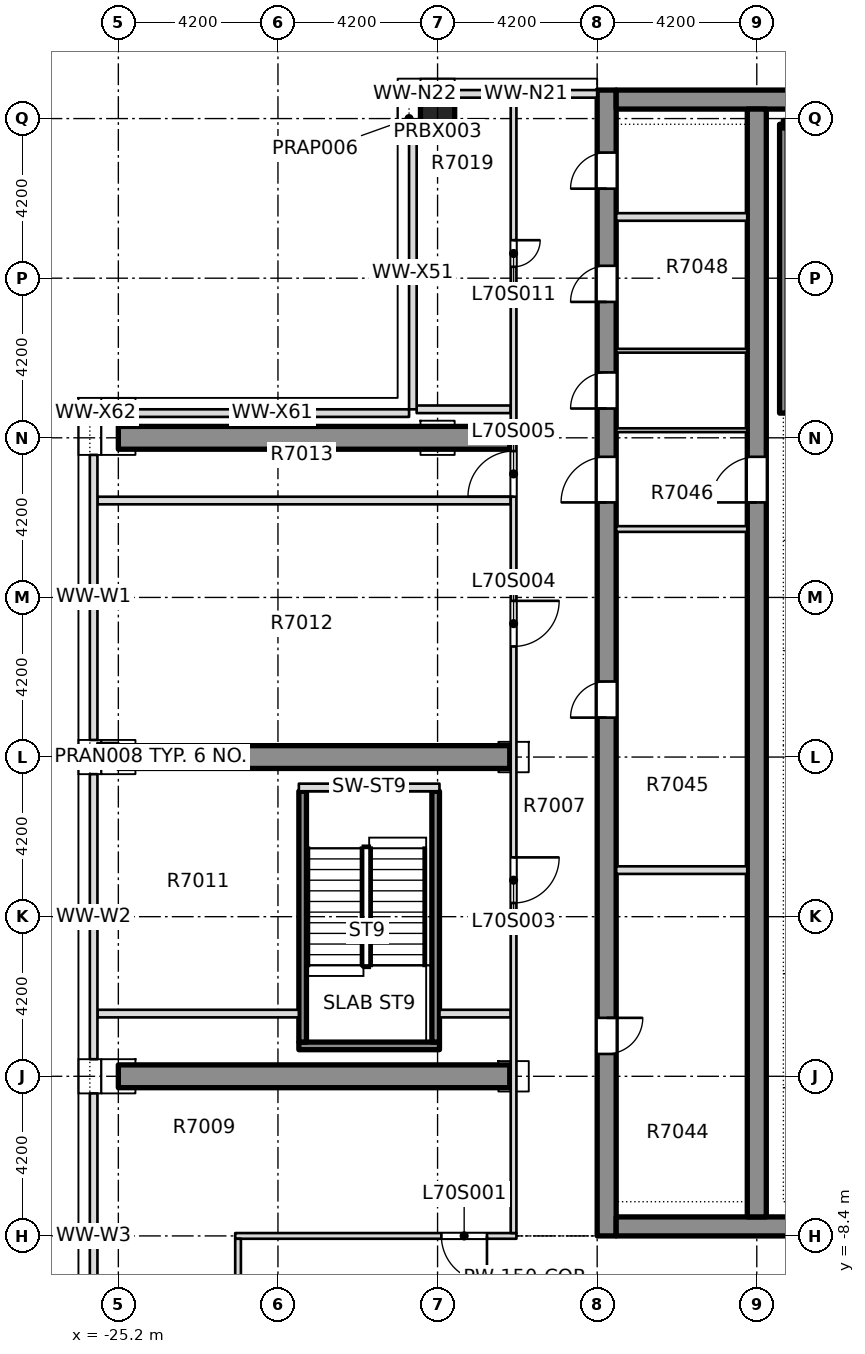
"""IFC4 building model, lengths in metres.
Left out: names, types, materials, properties, quantities, classifications, styles, units other than length and angle.
Written with IfcOpenShell. Run it as: python <this file> out.ifc"""

import sys

from ifc_helpers import new_model, si_unit, direction, frame, frame_2d, origin, origin_2d, place, context, subcontext, project, spatial, rectangle, extrude, element, fill, save


model = new_model("IFC4")
c1 = context("Model", 3, precision=1e-05, world=origin(), true_north=direction((0.0, 1.0)))
c2 = subcontext(c1, "Body", "Model", "MODEL_VIEW")
j1 = project(units=[si_unit("LENGTHUNIT", "METRE"), si_unit("PLANEANGLEUNIT", "RADIAN")], contexts=[c1])
p1 = place(None, origin())
s1 = spatial("IfcSite", under=j1, at=p1, CompositionType="ELEMENT")
p2 = place(p1, origin())
s2 = spatial("IfcBuilding", under=s1, at=p2, CompositionType="ELEMENT")
p3 = place(p2, frame((0.0, 0.0, 264.85)))
s3 = spatial("IfcBuildingStorey", under=s2, at=p3, CompositionType="ELEMENT", Elevation=264.85)
p4 = place(p3, frame((-12.35, -8.4, -0.5), z_axis=(0.0, 0.0, 1.0), x_axis=(0.0, 1.0, 0.0)))
e1 = element("IfcWall", 1, at=p4, inside=s3, PredefinedType="SHEAR", context=c2, shape_type="SweptSolid", body=[
    extrude(rectangle(XDim=30.15, YDim=0.5, at=frame_2d((15.075, 0.0))), origin(), (0.0, 0.0, 1.0), 4.5),
])
p5 = place(p4, frame((4.788, 0.0, 0.5)))
e2 = element("IfcOpeningElement", 2, at=p5, cuts=e1, PredefinedType="OPENING", context=c2, shape_type="SweptSolid", body=[
    extrude(rectangle(XDim=0.95, YDim=2.1, at=frame_2d((0.475, 1.05))), frame((0.0, 0.26, 0.0), z_axis=(0.0, -1.0, 0.0), x_axis=(1.0, 0.0, 0.0)), (0.0, 0.0, 1.0), 0.52),
])
p6 = place(p4, frame((13.638, 0.0, 0.5)))
e3 = element("IfcOpeningElement", 3, at=p6, cuts=e1, PredefinedType="OPENING", context=c2, shape_type="SweptSolid", body=[
    extrude(rectangle(XDim=0.95, YDim=2.1, at=frame_2d((0.475, 1.05))), frame((0.0, 0.26, 0.0), z_axis=(0.0, -1.0, 0.0), x_axis=(1.0, 0.0, 0.0)), (0.0, 0.0, 1.0), 0.52),
])
p7 = place(p4, frame((21.771, 0.0, 0.5)))
e4 = element("IfcOpeningElement", 4, at=p7, cuts=e1, PredefinedType="OPENING", context=c2, shape_type="SweptSolid", body=[
    extrude(rectangle(XDim=0.95, YDim=2.1, at=frame_2d((0.475, 1.05))), frame((0.0, 0.26, 0.0), z_axis=(0.0, -1.0, 0.0), x_axis=(1.0, 0.0, 0.0)), (0.0, 0.0, 1.0), 0.52),
])
p8 = place(p4, frame((24.576, 0.0, 0.5)))
e5 = element("IfcOpeningElement", 5, at=p8, cuts=e1, PredefinedType="OPENING", context=c2, shape_type="SweptSolid", body=[
    extrude(rectangle(XDim=0.95, YDim=2.1, at=frame_2d((0.475, 1.05))), frame((0.0, 0.26, 0.0), z_axis=(0.0, -1.0, 0.0), x_axis=(1.0, 0.0, 0.0)), (0.0, 0.0, 1.0), 0.52),
])
p9 = place(p4, frame((27.555, 0.0, 0.5)))
e6 = element("IfcOpeningElement", 6, at=p9, cuts=e1, PredefinedType="OPENING", context=c2, shape_type="SweptSolid", body=[
    extrude(rectangle(XDim=0.95, YDim=2.1, at=frame_2d((0.475, 1.05))), frame((0.0, 0.26, 0.0), z_axis=(0.0, -1.0, 0.0), x_axis=(1.0, 0.0, 0.0)), (0.0, 0.0, 1.0), 0.52),
])
p10 = place(p4, frame((19.3, 0.0, 0.5)))
e7 = element("IfcOpeningElement", 7, at=p10, cuts=e1, PredefinedType="OPENING", context=c2, shape_type="SweptSolid", body=[
    extrude(rectangle(XDim=1.2, YDim=2.1, at=frame_2d((0.6, 1.05))), frame((0.0, 0.26, 0.0), z_axis=(0.0, -1.0, 0.0), x_axis=(1.0, 0.0, 0.0)), (0.0, 0.0, 1.0), 0.52),
])
p11 = place(p3, frame((-12.1, -8.15, -0.5), z_axis=(0.0, 0.0, 1.0), x_axis=(1.0, 0.0, 0.0)))
e8 = element("IfcWall", 8, at=p11, inside=s3, PredefinedType="SHEAR", context=c2, shape_type="SweptSolid", body=[
    extrude(rectangle(XDim=24.2, YDim=0.5, at=frame_2d((12.1, 0.0))), origin(), (0.0, 0.0, 1.0), 4.5),
])
p12 = place(p11, frame((6.6, 0.0, 0.5)))
e9 = element("IfcOpeningElement", 9, at=p12, cuts=e8, PredefinedType="OPENING", context=c2, shape_type="SweptSolid", body=[
    extrude(rectangle(XDim=1.8, YDim=2.1, at=frame_2d((0.9, 1.05))), frame((0.0, 0.26, 0.0), z_axis=(0.0, -1.0, 0.0), x_axis=(1.0, 0.0, 0.0)), (0.0, 0.0, 1.0), 0.52),
])
p13 = place(p11, frame((15.8, 0.0, 0.5)))
e10 = element("IfcOpeningElement", 10, at=p13, cuts=e8, PredefinedType="OPENING", context=c2, shape_type="SweptSolid", body=[
    extrude(rectangle(XDim=1.8, YDim=2.1, at=frame_2d((0.9, 1.05))), frame((0.0, 0.26, 0.0), z_axis=(0.0, -1.0, 0.0), x_axis=(1.0, 0.0, 0.0)), (0.0, 0.0, 1.0), 0.52),
])
p14 = place(p3, frame((-12.1, 21.5, -0.5), z_axis=(0.0, 0.0, 1.0), x_axis=(1.0, 0.0, 0.0)))
e11 = element("IfcWall", 11, at=p14, inside=s3, PredefinedType="SHEAR", context=c2, shape_type="SweptSolid", body=[
    extrude(rectangle(XDim=24.2, YDim=0.5, at=frame_2d((12.1, 0.0))), origin(), (0.0, 0.0, 1.0), 4.5),
])
p15 = place(p3, frame((-8.4, -7.9, -0.5), z_axis=(0.0, 0.0, 1.0), x_axis=(0.0, 1.0, 0.0)))
e12 = element("IfcWall", 12, at=p15, inside=s3, PredefinedType="SHEAR", context=c2, shape_type="SweptSolid", body=[
    extrude(rectangle(XDim=29.15, YDim=0.5, at=frame_2d((14.575, 0.0))), origin(), (0.0, 0.0, 1.0), 4.5),
])
p16 = place(p15, frame((18.8, 0.0, 0.5)))
e13 = element("IfcOpeningElement", 13, at=p16, cuts=e12, PredefinedType="OPENING", context=c2, shape_type="SweptSolid", body=[
    extrude(rectangle(XDim=1.2, YDim=2.1, at=frame_2d((0.6, 1.05))), frame((0.0, 0.26, 0.0), z_axis=(0.0, -1.0, 0.0), x_axis=(1.0, 0.0, 0.0)), (0.0, 0.0, 1.0), 0.52),
])
p17 = place(p3, frame((-16.8, 21.0, -0.5), z_axis=(0.0, 0.0, 1.0), x_axis=(1.0, 0.0, 0.0)))
e14 = element("IfcColumn", 14, at=p17, inside=s3, PredefinedType="COLUMN", context=c2, shape_type="SweptSolid", body=[
    extrude(rectangle(XDim=0.9, YDim=0.9, at=origin_2d()), origin(), (0.0, 0.0, 1.0), 4.5),
])
for number, where, z_axis, x_axis in (
    (15, (-14.9, -4.2, 0.0), (0.0, 0.0, 1.0), (-1.0, 0.0, 0.0)),
    (16, (-14.9, 4.2, 0.0), (0.0, 0.0, 1.0), (-1.0, 0.0, 0.0)),
    (17, (-14.9, 12.6, 0.0), (0.0, 0.0, 1.0), (-1.0, 0.0, 0.0)),
):
    element("IfcWall", number, at=place(p3, frame(where, z_axis=z_axis, x_axis=x_axis)), inside=s3, PredefinedType="SHEAR", context=c2, shape_type="SweptSolid", body=[
        extrude(rectangle(XDim=10.3, YDim=0.6, at=frame_2d((5.15, 0.0))), origin(), (0.0, 0.0, 1.0), 4.0),
    ])
p18 = place(p3, frame((-22.125, -8.4, 0.0), z_axis=(0.0, 0.0, 1.0), x_axis=(1.0, 0.0, 0.0)))
e18 = element("IfcWall", 18, at=p18, inside=s3, PredefinedType="PARTITIONING", context=c2, shape_type="SweptSolid", body=[
    extrude(rectangle(XDim=7.4, YDim=0.15, at=frame_2d((3.7, 0.0))), origin(), (0.0, 0.0, 1.0), 4.0),
])
p19 = place(p18, frame((5.425, 0.0, 0.0)))
e19 = element("IfcOpeningElement", 19, at=p19, cuts=e18, PredefinedType="OPENING", context=c2, shape_type="SweptSolid", body=[
    extrude(rectangle(XDim=1.2, YDim=2.1, at=frame_2d((0.6, 1.05))), frame((0.0, 0.085, 0.0), z_axis=(0.0, -1.0, 0.0), x_axis=(1.0, 0.0, 0.0)), (0.0, 0.0, 1.0), 0.17),
])
p20 = place(p3, frame((-25.75, -2.55, 0.0), z_axis=(0.0, 0.0, 1.0), x_axis=(1.0, 0.0, 0.0)))
e20 = element("IfcWall", 20, at=p20, inside=s3, PredefinedType="PARTITIONING", context=c2, shape_type="SweptSolid", body=[
    extrude(rectangle(XDim=5.3, YDim=0.2, at=frame_2d((2.65, 0.0))), origin(), (0.0, 0.0, 1.0), 4.0),
])
p21 = place(p3, frame((-16.75, -2.55, 0.0), z_axis=(0.0, 0.0, 1.0), x_axis=(1.0, 0.0, 0.0)))
e21 = element("IfcWall", 21, at=p21, inside=s3, PredefinedType="PARTITIONING", context=c2, shape_type="SweptSolid", body=[
    extrude(rectangle(XDim=1.875, YDim=0.2, at=frame_2d((0.938, 0.0))), origin(), (0.0, 0.0, 1.0), 4.0),
])
p22 = place(p3, frame((-25.75, 4.47, 0.0), z_axis=(0.0, 0.0, 1.0), x_axis=(1.0, 0.0, 0.0)))
e22 = element("IfcWall", 22, at=p22, inside=s3, PredefinedType="PARTITIONING", context=c2, shape_type="SweptSolid", body=[
    extrude(rectangle(XDim=0.549, YDim=0.2, at=frame_2d((0.274, 0.0))), origin(), (0.0, 0.0, 1.0), 4.0),
])
p23 = place(p3, frame((-25.75, 10.95, 0.0), z_axis=(0.0, 0.0, 1.0), x_axis=(1.0, 0.0, 0.0)))
e23 = element("IfcWall", 23, at=p23, inside=s3, PredefinedType="PARTITIONING", context=c2, shape_type="SweptSolid", body=[
    extrude(rectangle(XDim=10.875, YDim=0.2, at=frame_2d((5.438, 0.0))), origin(), (0.0, 0.0, 1.0), 4.0),
])
p24 = place(p3, frame((-17.35, 13.35, 0.0), z_axis=(0.0, 0.0, 1.0), x_axis=(1.0, 0.0, 0.0)))
e24 = element("IfcWall", 24, at=p24, inside=s3, PredefinedType="PARTITIONING", context=c2, shape_type="SweptSolid", body=[
    extrude(rectangle(XDim=2.475, YDim=0.2, at=frame_2d((1.238, 0.0))), origin(), (0.0, 0.0, 1.0), 4.0),
])
p25 = place(p3, frame((-22.05, -12.299, 0.0), z_axis=(0.0, 0.0, 1.0), x_axis=(0.0, 1.0, 0.0)))
e25 = element("IfcWall", 25, at=p25, inside=s3, PredefinedType="PARTITIONING", context=c2, shape_type="SweptSolid", body=[
    extrude(rectangle(XDim=3.824, YDim=0.15, at=frame_2d((1.912, 0.0))), origin(), (0.0, 0.0, 1.0), 4.0),
])
p26 = place(p3, frame((-14.8, -8.325, 0.0), z_axis=(0.0, 0.0, 1.0), x_axis=(0.0, 1.0, 0.0)))
e26 = element("IfcWall", 26, at=p26, inside=s3, PredefinedType="PARTITIONING", context=c2, shape_type="SweptSolid", body=[
    extrude(rectangle(XDim=29.875, YDim=0.15, at=frame_2d((14.938, 0.0))), origin(), (0.0, 0.0, 1.0), 4.0),
])
p27 = place(p26, frame((8.685, 0.0, 0.0)))
e27 = element("IfcOpeningElement", 27, at=p27, cuts=e26, PredefinedType="OPENING", context=c2, shape_type="SweptSolid", body=[
    extrude(rectangle(XDim=1.2, YDim=2.1, at=frame_2d((0.6, 1.05))), frame((0.0, 0.085, 0.0), z_axis=(0.0, -1.0, 0.0), x_axis=(1.0, 0.0, 0.0)), (0.0, 0.0, 1.0), 0.17),
])
p28 = place(p26, frame((15.435, 0.0, 0.0)))
e28 = element("IfcOpeningElement", 28, at=p28, cuts=e26, PredefinedType="OPENING", context=c2, shape_type="SweptSolid", body=[
    extrude(rectangle(XDim=1.2, YDim=2.1, at=frame_2d((0.6, 1.05))), frame((0.0, 0.085, 0.0), z_axis=(0.0, -1.0, 0.0), x_axis=(1.0, 0.0, 0.0)), (0.0, 0.0, 1.0), 0.17),
])
p29 = place(p26, frame((19.375, 0.0, 0.0)))
e29 = element("IfcOpeningElement", 29, at=p29, cuts=e26, PredefinedType="OPENING", context=c2, shape_type="SweptSolid", body=[
    extrude(rectangle(XDim=1.2, YDim=2.1, at=frame_2d((0.6, 1.05))), frame((0.0, 0.085, 0.0), z_axis=(0.0, -1.0, 0.0), x_axis=(1.0, 0.0, 0.0)), (0.0, 0.0, 1.0), 0.17),
])
p30 = place(p26, frame((25.425, 0.0, 0.0)))
e30 = element("IfcOpeningElement", 30, at=p30, cuts=e26, PredefinedType="OPENING", context=c2, shape_type="SweptSolid", body=[
    extrude(rectangle(XDim=0.7, YDim=2.1, at=frame_2d((0.35, 1.05))), frame((0.0, 0.085, 0.0), z_axis=(0.0, -1.0, 0.0), x_axis=(1.0, 0.0, 0.0)), (0.0, 0.0, 1.0), 0.17),
])
p31 = place(p3, frame((-12.6, 21.65, 0.0), z_axis=(0.0, 0.0, 1.0), x_axis=(-1.0, 0.0, 0.0)))
e31 = element("IfcWall", 31, at=p31, inside=s3, PredefinedType="STANDARD", context=c2, shape_type="SweptSolid", body=[
    extrude(rectangle(XDim=3.75, YDim=0.2, at=frame_2d((1.875, 0.0))), origin(), (0.0, 0.0, 1.0), 4.0),
])
p32 = place(p3, frame((-17.25, 21.65, 0.0), z_axis=(0.0, 0.0, 1.0), x_axis=(-1.0, 0.0, 0.0)))
e32 = element("IfcWall", 32, at=p32, inside=s3, PredefinedType="STANDARD", context=c2, shape_type="SweptSolid", body=[
    extrude(rectangle(XDim=0.3, YDim=0.2, at=frame_2d((0.15, 0.0))), origin(), (0.0, 0.0, 1.0), 4.0),
])
for number, where, z_axis, x_axis in (
    (33, (-17.45, 20.55, 0.0), (0.0, 0.0, 1.0), (0.0, -1.0, 0.0)),
    (34, (-17.55, 13.25, 0.0), (0.0, 0.0, 1.0), (-1.0, 0.0, 0.0)),
):
    element("IfcWall", number, at=place(p3, frame(where, z_axis=z_axis, x_axis=x_axis)), inside=s3, PredefinedType="STANDARD", context=c2, shape_type="SweptSolid", body=[
        extrude(rectangle(XDim=7.2, YDim=0.2, at=frame_2d((3.6, 0.0))), origin(), (0.0, 0.0, 1.0), 4.0),
    ])
p33 = place(p3, frame((-25.65, 13.25, 0.0), z_axis=(0.0, 0.0, 1.0), x_axis=(-1.0, 0.0, 0.0)))
e35 = element("IfcWall", 35, at=p33, inside=s3, PredefinedType="STANDARD", context=c2, shape_type="SweptSolid", body=[
    extrude(rectangle(XDim=0.3, YDim=0.2, at=frame_2d((0.15, 0.0))), origin(), (0.0, 0.0, 1.0), 4.0),
])
for number, where, z_axis, x_axis in (
    (36, (-25.85, 12.15, 0.0), (0.0, 0.0, 1.0), (0.0, -1.0, 0.0)),
    (37, (-25.85, 3.75, 0.0), (0.0, 0.0, 1.0), (0.0, -1.0, 0.0)),
    (38, (-25.85, -4.65, 0.0), (0.0, 0.0, 1.0), (0.0, -1.0, 0.0)),
):
    element("IfcWall", number, at=place(p3, frame(where, z_axis=z_axis, x_axis=x_axis)), inside=s3, PredefinedType="STANDARD", context=c2, shape_type="SweptSolid", body=[
        extrude(rectangle(XDim=7.5, YDim=0.2, at=frame_2d((3.75, 0.0))), origin(), (0.0, 0.0, 1.0), 4.0),
    ])
p34 = place(p3, frame((-12.099, 1.225, 0.0), z_axis=(0.0, 0.0, 1.0), x_axis=(1.0, 0.0, 0.0)))
e39 = element("IfcWall", 39, at=p34, inside=s3, PredefinedType="PARTITIONING", context=c2, shape_type="SweptSolid", body=[
    extrude(rectangle(XDim=3.448, YDim=0.2, at=frame_2d((1.724, 0.0))), origin(), (0.0, 0.0, 1.0), 4.0),
])
p35 = place(p3, frame((-12.099, 10.2, 0.0), z_axis=(0.0, 0.0, 1.0), x_axis=(1.0, 0.0, 0.0)))
e40 = element("IfcWall", 40, at=p35, inside=s3, PredefinedType="PARTITIONING", context=c2, shape_type="SweptSolid", body=[
    extrude(rectangle(XDim=3.448, YDim=0.15, at=frame_2d((1.724, 0.0))), origin(), (0.0, 0.0, 1.0), 4.0),
])
p36 = place(p3, frame((-12.099, 12.8, 0.0), z_axis=(0.0, 0.0, 1.0), x_axis=(1.0, 0.0, 0.0)))
e41 = element("IfcWall", 41, at=p36, inside=s3, PredefinedType="PARTITIONING", context=c2, shape_type="SweptSolid", body=[
    extrude(rectangle(XDim=3.448, YDim=0.1, at=frame_2d((1.724, 0.0))), origin(), (0.0, 0.0, 1.0), 2.5),
])
p37 = place(p3, frame((-12.099, 14.891, 0.0), z_axis=(0.0, 0.0, 1.0), x_axis=(1.0, 0.0, 0.0)))
e42 = element("IfcWall", 42, at=p37, inside=s3, PredefinedType="PARTITIONING", context=c2, shape_type="SweptSolid", body=[
    extrude(rectangle(XDim=3.448, YDim=0.1, at=frame_2d((1.724, 0.0))), origin(), (0.0, 0.0, 1.0), 4.0),
])
p38 = place(p3, frame((-12.099, 18.411, 0.0), z_axis=(0.0, 0.0, 1.0), x_axis=(1.0, 0.0, 0.0)))
e43 = element("IfcWall", 43, at=p38, inside=s3, PredefinedType="PARTITIONING", context=c2, shape_type="SweptSolid", body=[
    extrude(rectangle(XDim=3.448, YDim=0.2, at=frame_2d((1.724, 0.0))), origin(), (0.0, 0.0, 1.0), 4.0),
])
p39 = place(p3, frame((-20.45, -3.4, 0.0), z_axis=(0.0, 0.0, 1.0), x_axis=(1.0, 0.0, 0.0)))
e44 = element("IfcWall", 44, at=p39, inside=s3, PredefinedType="SOLIDWALL", context=c2, shape_type="SweptSolid", body=[
    extrude(rectangle(XDim=3.7, YDim=0.2, at=frame_2d((1.85, 0.0))), origin(), (0.0, 0.0, 1.0), 4.0),
])
p40 = place(p3, frame((-20.45, 3.4, 0.0), z_axis=(0.0, 0.0, 1.0), x_axis=(1.0, 0.0, 0.0)))
e45 = element("IfcWall", 45, at=p40, inside=s3, PredefinedType="PARTITIONING", context=c2, shape_type="SweptSolid", body=[
    extrude(rectangle(XDim=3.7, YDim=0.2, at=frame_2d((1.85, 0.0))), origin(), (0.0, 0.0, 1.0), 4.0),
])
for number, where, z_axis, x_axis in (
    (46, (-20.35, -3.3, 0.0), (0.0, 0.0, 1.0), (0.0, 1.0, 0.0)),
    (47, (-16.85, -3.3, 0.0), (0.0, 0.0, 1.0), (0.0, 1.0, 0.0)),
):
    element("IfcWall", number, at=place(p3, frame(where, z_axis=z_axis, x_axis=x_axis)), inside=s3, PredefinedType="SOLIDWALL", context=c2, shape_type="SweptSolid", body=[
        extrude(rectangle(XDim=6.6, YDim=0.2, at=frame_2d((3.3, 0.0))), origin(), (0.0, 0.0, 1.0), 4.0),
    ])
p41 = place(p3, frame((-7.7, 13.25, 0.0), z_axis=(0.0, 0.0, 1.0), x_axis=(0.0, 1.0, 0.0)))
e48 = element("IfcWall", 48, at=p41, inside=s3, PredefinedType="SOLIDWALL", context=c2, shape_type="SweptSolid", body=[
    extrude(rectangle(XDim=7.6, YDim=0.2, at=frame_2d((3.8, 0.0))), origin(), (0.0, 0.0, 1.0), 4.0),
])
p42 = place(p3, frame((-7.7, 20.85, 0.0), z_axis=(0.0, 0.0, 1.0), x_axis=(1.0, 0.0, 0.0)))
e49 = element("IfcWall", 49, at=p42, inside=s3, PredefinedType="SOLIDWALL", context=c2, shape_type="SweptSolid", body=[
    extrude(rectangle(XDim=3.55, YDim=0.2, at=frame_2d((1.775, 0.0))), origin(), (0.0, 0.0, 1.0), 4.0),
])
p43 = place(p19, origin())
e50 = element("IfcDoor", 50, at=p43, inside=s3, OperationType="SINGLE_SWING_RIGHT", PredefinedType="DOOR", context=c2, shape_type="SweptSolid", body=[
    extrude(rectangle(XDim=1.2, YDim=2.1, at=frame_2d((0.6, 1.05))), frame((0.0, 0.025, 0.0), z_axis=(0.0, -1.0, 0.0), x_axis=(1.0, 0.0, 0.0)), (0.0, 0.0, 1.0), 0.05),
])
fill(e19, e50)
p44 = place(p27, origin())
e51 = element("IfcDoor", 51, at=p44, inside=s3, OperationType="SINGLE_SWING_RIGHT", PredefinedType="DOOR", context=c2, shape_type="SweptSolid", body=[
    extrude(rectangle(XDim=1.2, YDim=2.1, at=frame_2d((0.6, 1.05))), frame((0.0, 0.025, 0.0), z_axis=(0.0, -1.0, 0.0), x_axis=(1.0, 0.0, 0.0)), (0.0, 0.0, 1.0), 0.05),
])
fill(e27, e51)
p45 = place(p28, origin())
e52 = element("IfcDoor", 52, at=p45, inside=s3, OperationType="SINGLE_SWING_RIGHT", PredefinedType="DOOR", context=c2, shape_type="SweptSolid", body=[
    extrude(rectangle(XDim=1.2, YDim=2.1, at=frame_2d((0.6, 1.05))), frame((0.0, 0.025, 0.0), z_axis=(0.0, -1.0, 0.0), x_axis=(1.0, 0.0, 0.0)), (0.0, 0.0, 1.0), 0.05),
])
fill(e28, e52)
p46 = place(p29, origin())
e53 = element("IfcDoor", 53, at=p46, inside=s3, OperationType="SINGLE_SWING_LEFT", PredefinedType="DOOR", context=c2, shape_type="SweptSolid", body=[
    extrude(rectangle(XDim=1.2, YDim=2.1, at=frame_2d((0.6, 1.05))), frame((0.0, 0.025, 0.0), z_axis=(0.0, -1.0, 0.0), x_axis=(1.0, 0.0, 0.0)), (0.0, 0.0, 1.0), 0.05),
])
fill(e29, e53)
p47 = place(p30, origin())
e54 = element("IfcDoor", 54, at=p47, inside=s3, OperationType="SINGLE_SWING_LEFT", PredefinedType="DOOR", context=c2, shape_type="SweptSolid", body=[
    extrude(rectangle(XDim=0.7, YDim=2.1, at=frame_2d((0.35, 1.05))), frame((0.0, 0.025, 0.0), z_axis=(0.0, -1.0, 0.0), x_axis=(1.0, 0.0, 0.0)), (0.0, 0.0, 1.0), 0.05),
])
fill(e30, e54)
p48 = place(p5, origin())
e55 = element("IfcDoor", 55, at=p48, inside=s3, OperationType="SINGLE_SWING_LEFT", PredefinedType="DOOR", context=c2, shape_type="SweptSolid", body=[
    extrude(rectangle(XDim=0.95, YDim=2.1, at=frame_2d((0.475, 1.05))), frame((0.0, 0.025, 0.0), z_axis=(0.0, -1.0, 0.0), x_axis=(1.0, 0.0, 0.0)), (0.0, 0.0, 1.0), 0.05),
])
fill(e2, e55)
p49 = place(p6, origin())
e56 = element("IfcDoor", 56, at=p49, inside=s3, OperationType="SINGLE_SWING_LEFT", PredefinedType="DOOR", context=c2, shape_type="SweptSolid", body=[
    extrude(rectangle(XDim=0.95, YDim=2.1, at=frame_2d((0.475, 1.05))), frame((0.0, 0.025, 0.0), z_axis=(0.0, -1.0, 0.0), x_axis=(1.0, 0.0, 0.0)), (0.0, 0.0, 1.0), 0.05),
])
fill(e3, e56)
p50 = place(p7, origin())
e57 = element("IfcDoor", 57, at=p50, inside=s3, OperationType="SINGLE_SWING_LEFT", PredefinedType="DOOR", context=c2, shape_type="SweptSolid", body=[
    extrude(rectangle(XDim=0.95, YDim=2.1, at=frame_2d((0.475, 1.05))), frame((0.0, 0.025, 0.0), z_axis=(0.0, -1.0, 0.0), x_axis=(1.0, 0.0, 0.0)), (0.0, 0.0, 1.0), 0.05),
])
fill(e4, e57)
p51 = place(p8, origin())
e58 = element("IfcDoor", 58, at=p51, inside=s3, OperationType="SINGLE_SWING_LEFT", PredefinedType="DOOR", context=c2, shape_type="SweptSolid", body=[
    extrude(rectangle(XDim=0.95, YDim=2.1, at=frame_2d((0.475, 1.05))), frame((0.0, 0.025, 0.0), z_axis=(0.0, -1.0, 0.0), x_axis=(1.0, 0.0, 0.0)), (0.0, 0.0, 1.0), 0.05),
])
fill(e5, e58)
p52 = place(p9, origin())
e59 = element("IfcDoor", 59, at=p52, inside=s3, OperationType="SINGLE_SWING_LEFT", PredefinedType="DOOR", context=c2, shape_type="SweptSolid", body=[
    extrude(rectangle(XDim=0.95, YDim=2.1, at=frame_2d((0.475, 1.05))), frame((0.0, 0.025, 0.0), z_axis=(0.0, -1.0, 0.0), x_axis=(1.0, 0.0, 0.0)), (0.0, 0.0, 1.0), 0.05),
])
fill(e6, e59)
p53 = place(p10, origin())
e60 = element("IfcDoor", 60, at=p53, inside=s3, OperationType="SINGLE_SWING_LEFT", PredefinedType="DOOR", context=c2, shape_type="SweptSolid", body=[
    extrude(rectangle(XDim=1.2, YDim=2.1, at=frame_2d((0.6, 1.05))), frame((0.0, 0.025, 0.0), z_axis=(0.0, -1.0, 0.0), x_axis=(1.0, 0.0, 0.0)), (0.0, 0.0, 1.0), 0.05),
])
fill(e7, e60)
p54 = place(p16, origin())
e61 = element("IfcDoor", 61, at=p54, inside=s3, OperationType="SINGLE_SWING_LEFT", PredefinedType="DOOR", context=c2, shape_type="SweptSolid", body=[
    extrude(rectangle(XDim=1.2, YDim=2.1, at=frame_2d((0.6, 1.05))), frame((0.0, 0.025, 0.0), z_axis=(0.0, -1.0, 0.0), x_axis=(1.0, 0.0, 0.0)), (0.0, 0.0, 1.0), 0.05),
])
fill(e13, e61)
save(model, sys.argv[1])
